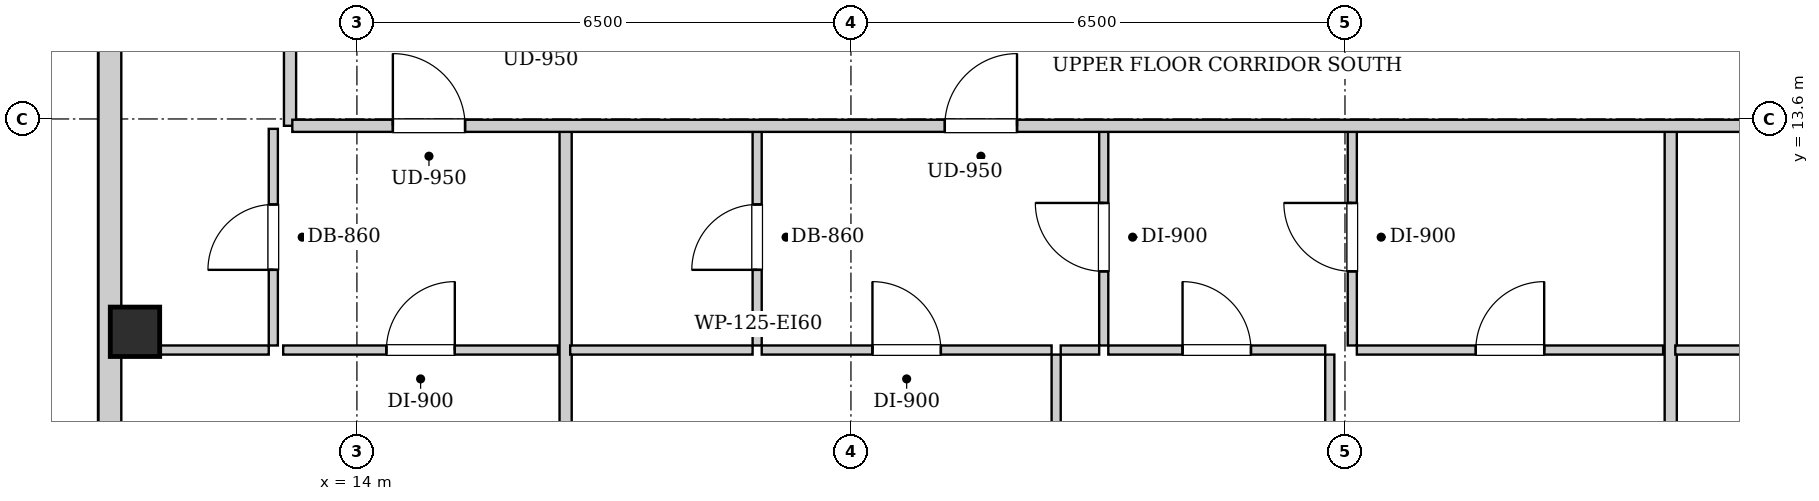
"""IFC4 building model, lengths in metres.
Left out: names, types, materials, properties, quantities, classifications, styles, units other than length and angle.
Written with IfcOpenShell. Run it as: python <this file> out.ifc"""

import sys

from ifc_helpers import new_model, si_unit, direction, frame, frame_2d, origin, origin_2d, place, context, subcontext, project, spatial, rectangle, extrude, element, fill, save


model = new_model("IFC4")
c1 = context("Model", 3, precision=1e-05, world=origin(), true_north=direction((0.0, 1.0)))
c2 = subcontext(c1, "Body", "Model", "MODEL_VIEW")
j1 = project(units=[si_unit("LENGTHUNIT", "METRE"), si_unit("PLANEANGLEUNIT", "RADIAN")], contexts=[c1])
p1 = place(None, origin())
s1 = spatial("IfcSite", under=j1, at=p1, CompositionType="ELEMENT")
p2 = place(p1, origin())
s2 = spatial("IfcBuilding", under=s1, at=p2, CompositionType="ELEMENT")
p3 = place(p2, frame((0.0, 0.0, 200.8)))
s3 = spatial("IfcBuildingStorey", under=s2, at=p3, CompositionType="ELEMENT", Elevation=200.8)
p4 = place(p3, frame((11.08, 10.8, 0.0), z_axis=(0.0, 0.0, 1.0), x_axis=(1.0, 0.0, 0.0)))
e1 = element("IfcColumn", 1, at=p4, inside=s3, PredefinedType="COLUMN", context=c2, shape_type="SweptSolid", body=[
    extrude(rectangle(XDim=0.65, YDim=0.65, at=origin_2d()), origin(), (0.0, 0.0, 1.0), 3.3),
])
p5 = place(p3, frame((10.75, 6.3, 0.0), z_axis=(0.0, 0.0, 1.0), x_axis=(0.0, 1.0, 0.0)))
e2 = element("IfcWall", 2, at=p5, inside=s3, PredefinedType="SOLIDWALL", context=c2, shape_type="SweptSolid", body=[
    extrude(rectangle(XDim=31.4, YDim=0.3, at=frame_2d((15.7, 0.0))), origin(), (0.0, 0.0, 1.0), 3.04),
])
p6 = place(p5, frame((1.504, 0.0, 0.55)))
e3 = element("IfcOpeningElement", 3, at=p6, cuts=e2, PredefinedType="OPENING", context=c2, shape_type="SweptSolid", body=[
    extrude(rectangle(XDim=1.35, YDim=1.2, at=frame_2d((0.675, 0.6))), frame((0.0, 0.16, 0.0), z_axis=(0.0, -1.0, 0.0), x_axis=(1.0, 0.0, 0.0)), (0.0, 0.0, 1.0), 0.32),
])
p7 = place(p5, frame((28.546, 0.0, 0.55)))
e4 = element("IfcOpeningElement", 4, at=p7, cuts=e2, PredefinedType="OPENING", context=c2, shape_type="SweptSolid", body=[
    extrude(rectangle(XDim=1.35, YDim=1.2, at=frame_2d((0.675, 0.6))), frame((0.0, 0.16, 0.0), z_axis=(0.0, -1.0, 0.0), x_axis=(1.0, 0.0, 0.0)), (0.0, 0.0, 1.0), 0.32),
])
p8 = place(p5, frame((11.85, 0.0, 0.55)))
e5 = element("IfcOpeningElement", 5, at=p8, cuts=e2, PredefinedType="OPENING", context=c2, shape_type="SweptSolid", body=[
    extrude(rectangle(XDim=1.35, YDim=1.2, at=frame_2d((0.675, 0.6))), frame((0.0, 0.16, 0.0), z_axis=(0.0, -1.0, 0.0), x_axis=(1.0, 0.0, 0.0)), (0.0, 0.0, 1.0), 0.32),
])
p9 = place(p5, frame((9.185, 0.0, 0.55)))
e6 = element("IfcOpeningElement", 6, at=p9, cuts=e2, PredefinedType="OPENING", context=c2, shape_type="SweptSolid", body=[
    extrude(rectangle(XDim=1.35, YDim=1.2, at=frame_2d((0.675, 0.6))), frame((0.0, 0.16, 0.0), z_axis=(0.0, -1.0, 0.0), x_axis=(1.0, 0.0, 0.0)), (0.0, 0.0, 1.0), 0.32),
])
p10 = place(p5, frame((19.006, 0.0, 0.55)))
e7 = element("IfcOpeningElement", 7, at=p10, cuts=e2, PredefinedType="OPENING", context=c2, shape_type="SweptSolid", body=[
    extrude(rectangle(XDim=1.35, YDim=1.2, at=frame_2d((0.675, 0.6))), frame((0.0, 0.16, 0.0), z_axis=(0.0, -1.0, 0.0), x_axis=(1.0, 0.0, 0.0)), (0.0, 0.0, 1.0), 0.32),
])
p11 = place(p5, frame((20.616, 0.0, 0.55)))
e8 = element("IfcOpeningElement", 8, at=p11, cuts=e2, PredefinedType="OPENING", context=c2, shape_type="SweptSolid", body=[
    extrude(rectangle(XDim=1.35, YDim=1.2, at=frame_2d((0.675, 0.6))), frame((0.0, 0.16, 0.0), z_axis=(0.0, -1.0, 0.0), x_axis=(1.0, 0.0, 0.0)), (0.0, 0.0, 1.0), 0.32),
])
p12 = place(p3, frame((13.12, 13.51, 0.0), z_axis=(0.0, 0.0, 1.0), x_axis=(0.0, 1.0, 0.0)))
e9 = element("IfcWall", 9, at=p12, inside=s3, PredefinedType="PARTITIONING", context=c2, shape_type="SweptSolid", body=[
    extrude(rectangle(XDim=1.58, YDim=0.16, at=frame_2d((0.79, 0.0))), origin(), (0.0, 0.0, 1.0), 3.04),
])
p13 = place(p3, frame((12.9, 10.62, 0.0), z_axis=(0.0, 0.0, 1.0), x_axis=(0.0, 1.0, 0.0)))
e10 = element("IfcWall", 10, at=p13, inside=s3, PredefinedType="PARTITIONING", context=c2, shape_type="SweptSolid", body=[
    extrude(rectangle(XDim=2.85, YDim=0.12, at=frame_2d((1.425, 0.0))), origin(), (0.0, 0.0, 1.0), 3.04),
])
p14 = place(p13, frame((0.995, 0.0, 0.0)))
e11 = element("IfcOpeningElement", 11, at=p14, cuts=e10, PredefinedType="OPENING", context=c2, shape_type="SweptSolid", body=[
    extrude(rectangle(XDim=0.86, YDim=2.05, at=frame_2d((0.43, 1.025))), frame((0.0, 0.07, 0.0), z_axis=(0.0, -1.0, 0.0), x_axis=(1.0, 0.0, 0.0)), (0.0, 0.0, 1.0), 0.14),
])
p15 = place(p3, frame((10.99, 10.56, 0.0), z_axis=(0.0, 0.0, 1.0), x_axis=(1.0, 0.0, 0.0)))
e12 = element("IfcWall", 12, at=p15, inside=s3, PredefinedType="PARTITIONING", context=c2, shape_type="SweptSolid", body=[
    extrude(rectangle(XDim=1.85, YDim=0.12, at=frame_2d((0.925, 0.0))), origin(), (0.0, 0.0, 1.0), 3.04),
])
p16 = place(p3, frame((13.03, 10.56, 0.0), z_axis=(0.0, 0.0, 1.0), x_axis=(1.0, 0.0, 0.0)))
e13 = element("IfcWall", 13, at=p16, inside=s3, PredefinedType="PARTITIONING", context=c2, shape_type="SweptSolid", body=[
    extrude(rectangle(XDim=3.616, YDim=0.12, at=frame_2d((1.808, 0.0))), origin(), (0.0, 0.0, 1.0), 3.04),
])
p17 = place(p16, frame((1.358, 0.0, 0.0)))
e14 = element("IfcOpeningElement", 14, at=p17, cuts=e13, PredefinedType="OPENING", context=c2, shape_type="SweptSolid", body=[
    extrude(rectangle(XDim=0.9, YDim=2.05, at=frame_2d((0.45, 1.025))), frame((0.0, 0.07, 0.0), z_axis=(0.0, -1.0, 0.0), x_axis=(1.0, 0.0, 0.0)), (0.0, 0.0, 1.0), 0.14),
])
p18 = place(p3, frame((16.746, 6.06, 0.0), z_axis=(0.0, 0.0, 1.0), x_axis=(0.0, 1.0, 0.0)))
e15 = element("IfcWall", 15, at=p18, inside=s3, PredefinedType="PARTITIONING", context=c2, shape_type="SweptSolid", body=[
    extrude(rectangle(XDim=7.41, YDim=0.16, at=frame_2d((3.705, 0.0))), origin(), (0.0, 0.0, 1.0), 3.04),
])
p19 = place(p3, frame((19.266, 10.62, 0.0), z_axis=(0.0, 0.0, 1.0), x_axis=(0.0, 1.0, 0.0)))
e16 = element("IfcWall", 16, at=p19, inside=s3, PredefinedType="PARTITIONING", context=c2, shape_type="SweptSolid", body=[
    extrude(rectangle(XDim=2.85, YDim=0.12, at=frame_2d((1.425, 0.0))), origin(), (0.0, 0.0, 1.0), 3.04),
])
p20 = place(p19, frame((0.995, 0.0, 0.0)))
e17 = element("IfcOpeningElement", 17, at=p20, cuts=e16, PredefinedType="OPENING", context=c2, shape_type="SweptSolid", body=[
    extrude(rectangle(XDim=0.86, YDim=2.05, at=frame_2d((0.43, 1.025))), frame((0.0, 0.07, 0.0), z_axis=(0.0, -1.0, 0.0), x_axis=(1.0, 0.0, 0.0)), (0.0, 0.0, 1.0), 0.14),
])
p21 = place(p3, frame((16.806, 10.56, 0.0), z_axis=(0.0, 0.0, 1.0), x_axis=(1.0, 0.0, 0.0)))
e18 = element("IfcWall", 18, at=p21, inside=s3, PredefinedType="PARTITIONING", context=c2, shape_type="SweptSolid", body=[
    extrude(rectangle(XDim=2.4, YDim=0.12, at=frame_2d((1.2, 0.0))), origin(), (0.0, 0.0, 1.0), 3.04),
])
p22 = place(p3, frame((23.826, 10.62, 0.0), z_axis=(0.0, 0.0, 1.0), x_axis=(0.0, 1.0, 0.0)))
e19 = element("IfcWall", 19, at=p22, inside=s3, PredefinedType="PARTITIONING", context=c2, shape_type="SweptSolid", body=[
    extrude(rectangle(XDim=2.85, YDim=0.12, at=frame_2d((1.425, 0.0))), origin(), (0.0, 0.0, 1.0), 3.04),
])
p23 = place(p22, frame((0.975, 0.0, 0.0)))
e20 = element("IfcOpeningElement", 20, at=p23, cuts=e19, PredefinedType="OPENING", context=c2, shape_type="SweptSolid", body=[
    extrude(rectangle(XDim=0.9, YDim=2.05, at=frame_2d((0.45, 1.025))), frame((0.0, 0.07, 0.0), z_axis=(0.0, -1.0, 0.0), x_axis=(1.0, 0.0, 0.0)), (0.0, 0.0, 1.0), 0.14),
])
p24 = place(p3, frame((19.326, 10.56, 0.0), z_axis=(0.0, 0.0, 1.0), x_axis=(1.0, 0.0, 0.0)))
e21 = element("IfcWall", 21, at=p24, inside=s3, PredefinedType="PARTITIONING", context=c2, shape_type="SweptSolid", body=[
    extrude(rectangle(XDim=3.814, YDim=0.12, at=frame_2d((1.907, 0.0))), origin(), (0.0, 0.0, 1.0), 3.04),
])
p25 = place(p24, frame((1.457, 0.0, 0.0)))
e22 = element("IfcOpeningElement", 22, at=p25, cuts=e21, PredefinedType="OPENING", context=c2, shape_type="SweptSolid", body=[
    extrude(rectangle(XDim=0.9, YDim=2.05, at=frame_2d((0.45, 1.025))), frame((0.0, 0.07, 0.0), z_axis=(0.0, -1.0, 0.0), x_axis=(1.0, 0.0, 0.0)), (0.0, 0.0, 1.0), 0.14),
])
p26 = place(p3, frame((23.26, 10.56, 0.0), z_axis=(0.0, 0.0, 1.0), x_axis=(1.0, 0.0, 0.0)))
e23 = element("IfcWall", 23, at=p26, inside=s3, PredefinedType="PARTITIONING", context=c2, shape_type="SweptSolid", body=[
    extrude(rectangle(XDim=0.506, YDim=0.12, at=frame_2d((0.253, 0.0))), origin(), (0.0, 0.0, 1.0), 3.04),
])
p27 = place(p3, frame((27.096, 10.62, 0.0), z_axis=(0.0, 0.0, 1.0), x_axis=(0.0, 1.0, 0.0)))
e24 = element("IfcWall", 24, at=p27, inside=s3, PredefinedType="PARTITIONING", context=c2, shape_type="SweptSolid", body=[
    extrude(rectangle(XDim=2.85, YDim=0.12, at=frame_2d((1.425, 0.0))), origin(), (0.0, 0.0, 1.0), 3.04),
])
p28 = place(p27, frame((0.975, 0.0, 0.0)))
e25 = element("IfcOpeningElement", 25, at=p28, cuts=e24, PredefinedType="OPENING", context=c2, shape_type="SweptSolid", body=[
    extrude(rectangle(XDim=0.9, YDim=2.05, at=frame_2d((0.45, 1.025))), frame((0.0, 0.07, 0.0), z_axis=(0.0, -1.0, 0.0), x_axis=(1.0, 0.0, 0.0)), (0.0, 0.0, 1.0), 0.14),
])
p29 = place(p3, frame((23.886, 10.56, 0.0), z_axis=(0.0, 0.0, 1.0), x_axis=(1.0, 0.0, 0.0)))
e26 = element("IfcWall", 26, at=p29, inside=s3, PredefinedType="PARTITIONING", context=c2, shape_type="SweptSolid", body=[
    extrude(rectangle(XDim=2.854, YDim=0.12, at=frame_2d((1.427, 0.0))), origin(), (0.0, 0.0, 1.0), 3.04),
])
p30 = place(p29, frame((0.977, 0.0, 0.0)))
e27 = element("IfcOpeningElement", 27, at=p30, cuts=e26, PredefinedType="OPENING", context=c2, shape_type="SweptSolid", body=[
    extrude(rectangle(XDim=0.9, YDim=2.05, at=frame_2d((0.45, 1.025))), frame((0.0, 0.07, 0.0), z_axis=(0.0, -1.0, 0.0), x_axis=(1.0, 0.0, 0.0)), (0.0, 0.0, 1.0), 0.14),
])
p31 = place(p3, frame((27.156, 10.56, 0.0), z_axis=(0.0, 0.0, 1.0), x_axis=(1.0, 0.0, 0.0)))
e28 = element("IfcWall", 28, at=p31, inside=s3, PredefinedType="PARTITIONING", context=c2, shape_type="SweptSolid", body=[
    extrude(rectangle(XDim=4.03, YDim=0.12, at=frame_2d((2.015, 0.0))), origin(), (0.0, 0.0, 1.0), 3.04),
])
p32 = place(p31, frame((1.565, 0.0, 0.0)))
e29 = element("IfcOpeningElement", 29, at=p32, cuts=e28, PredefinedType="OPENING", context=c2, shape_type="SweptSolid", body=[
    extrude(rectangle(XDim=0.9, YDim=2.05, at=frame_2d((0.45, 1.025))), frame((0.0, 0.07, 0.0), z_axis=(0.0, -1.0, 0.0), x_axis=(1.0, 0.0, 0.0)), (0.0, 0.0, 1.0), 0.14),
])
p33 = place(p3, frame((23.2, 4.08, 0.0), z_axis=(0.0, 0.0, 1.0), x_axis=(0.0, 1.0, 0.0)))
e30 = element("IfcWall", 30, at=p33, inside=s3, PredefinedType="PARTITIONING", context=c2, shape_type="SweptSolid", body=[
    extrude(rectangle(XDim=6.42, YDim=0.12, at=frame_2d((3.21, 0.0))), origin(), (0.0, 0.0, 1.0), 3.04),
])
p34 = place(p33, frame((2.745, 0.0, 0.0)))
e31 = element("IfcOpeningElement", 31, at=p34, cuts=e30, PredefinedType="OPENING", context=c2, shape_type="SweptSolid", body=[
    extrude(rectangle(XDim=0.9, YDim=2.05, at=frame_2d((0.45, 1.025))), frame((0.0, 0.07, 0.0), z_axis=(0.0, -1.0, 0.0), x_axis=(1.0, 0.0, 0.0)), (0.0, 0.0, 1.0), 0.14),
])
p35 = place(p3, frame((26.8, 4.08, 0.0), z_axis=(0.0, 0.0, 1.0), x_axis=(0.0, 1.0, 0.0)))
e32 = element("IfcWall", 32, at=p35, inside=s3, PredefinedType="PARTITIONING", context=c2, shape_type="SweptSolid", body=[
    extrude(rectangle(XDim=6.42, YDim=0.12, at=frame_2d((3.21, 0.0))), origin(), (0.0, 0.0, 1.0), 3.04),
])
p36 = place(p35, frame((2.745, 0.0, 0.0)))
e33 = element("IfcOpeningElement", 33, at=p36, cuts=e32, PredefinedType="OPENING", context=c2, shape_type="SweptSolid", body=[
    extrude(rectangle(XDim=0.9, YDim=2.05, at=frame_2d((0.45, 1.025))), frame((0.0, 0.07, 0.0), z_axis=(0.0, -1.0, 0.0), x_axis=(1.0, 0.0, 0.0)), (0.0, 0.0, 1.0), 0.14),
])
p37 = place(p3, frame((31.286, 4.08, 0.0), z_axis=(0.0, 0.0, 1.0), x_axis=(0.0, 1.0, 0.0)))
e34 = element("IfcWall", 34, at=p37, inside=s3, PredefinedType="PARTITIONING", context=c2, shape_type="SweptSolid", body=[
    extrude(rectangle(XDim=9.39, YDim=0.16, at=frame_2d((4.695, 0.0))), origin(), (0.0, 0.0, 1.0), 3.04),
])
p38 = place(p3, frame((31.346, 10.56, 0.0), z_axis=(0.0, 0.0, 1.0), x_axis=(1.0, 0.0, 0.0)))
e35 = element("IfcWall", 35, at=p38, inside=s3, PredefinedType="PARTITIONING", context=c2, shape_type="SweptSolid", body=[
    extrude(rectangle(XDim=1.912, YDim=0.12, at=frame_2d((0.956, 0.0))), origin(), (0.0, 0.0, 1.0), 3.04),
])
p39 = place(p3, frame((13.15, 13.51, 0.0), z_axis=(0.0, 0.0, 1.0), x_axis=(1.0, 0.0, 0.0)))
e36 = element("IfcWall", 36, at=p39, inside=s3, PredefinedType="PARTITIONING", context=c2, shape_type="SweptSolid", body=[
    extrude(rectangle(XDim=24.6, YDim=0.16, at=frame_2d((12.3, 0.0))), origin(), (0.0, 0.0, 1.0), 3.04),
])
p40 = place(p39, frame((1.323, 0.0, 0.0)))
e37 = element("IfcOpeningElement", 37, at=p40, cuts=e36, PredefinedType="OPENING", context=c2, shape_type="SweptSolid", body=[
    extrude(rectangle(XDim=0.95, YDim=2.1, at=frame_2d((0.475, 1.05))), frame((0.0, 0.09, 0.0), z_axis=(0.0, -1.0, 0.0), x_axis=(1.0, 0.0, 0.0)), (0.0, 0.0, 1.0), 0.18),
])
p41 = place(p39, frame((8.585, 0.0, 0.0)))
e38 = element("IfcOpeningElement", 38, at=p41, cuts=e36, PredefinedType="OPENING", context=c2, shape_type="SweptSolid", body=[
    extrude(rectangle(XDim=0.95, YDim=2.1, at=frame_2d((0.475, 1.05))), frame((0.0, 0.09, 0.0), z_axis=(0.0, -1.0, 0.0), x_axis=(1.0, 0.0, 0.0)), (0.0, 0.0, 1.0), 0.18),
])
p42 = place(p39, frame((21.889, 0.0, 0.0)))
e39 = element("IfcOpeningElement", 39, at=p42, cuts=e36, PredefinedType="OPENING", context=c2, shape_type="SweptSolid", body=[
    extrude(rectangle(XDim=0.95, YDim=2.1, at=frame_2d((0.475, 1.05))), frame((0.0, 0.09, 0.0), z_axis=(0.0, -1.0, 0.0), x_axis=(1.0, 0.0, 0.0)), (0.0, 0.0, 1.0), 0.18),
])
p43 = place(p14, origin())
e40 = element("IfcDoor", 40, at=p43, inside=s3, OperationType="SINGLE_SWING_LEFT", PredefinedType="DOOR", context=c2, shape_type="SweptSolid", body=[
    extrude(rectangle(XDim=0.86, YDim=2.05, at=frame_2d((0.43, 1.025))), frame((0.0, 0.025, 0.0), z_axis=(0.0, -1.0, 0.0), x_axis=(1.0, 0.0, 0.0)), (0.0, 0.0, 1.0), 0.05),
])
fill(e11, e40)
p44 = place(p17, origin())
e41 = element("IfcDoor", 41, at=p44, inside=s3, OperationType="SINGLE_SWING_RIGHT", PredefinedType="DOOR", context=c2, shape_type="SweptSolid", body=[
    extrude(rectangle(XDim=0.9, YDim=2.05, at=frame_2d((0.45, 1.025))), frame((0.0, 0.025, 0.0), z_axis=(0.0, -1.0, 0.0), x_axis=(1.0, 0.0, 0.0)), (0.0, 0.0, 1.0), 0.05),
])
fill(e14, e41)
p45 = place(p20, origin())
e42 = element("IfcDoor", 42, at=p45, inside=s3, OperationType="SINGLE_SWING_LEFT", PredefinedType="DOOR", context=c2, shape_type="SweptSolid", body=[
    extrude(rectangle(XDim=0.86, YDim=2.05, at=frame_2d((0.43, 1.025))), frame((0.0, 0.025, 0.0), z_axis=(0.0, -1.0, 0.0), x_axis=(1.0, 0.0, 0.0)), (0.0, 0.0, 1.0), 0.05),
])
fill(e17, e42)
p46 = place(p23, origin())
e43 = element("IfcDoor", 43, at=p46, inside=s3, OperationType="SINGLE_SWING_RIGHT", PredefinedType="DOOR", context=c2, shape_type="SweptSolid", body=[
    extrude(rectangle(XDim=0.9, YDim=2.05, at=frame_2d((0.45, 1.025))), frame((0.0, 0.025, 0.0), z_axis=(0.0, -1.0, 0.0), x_axis=(1.0, 0.0, 0.0)), (0.0, 0.0, 1.0), 0.05),
])
fill(e20, e43)
p47 = place(p25, origin())
e44 = element("IfcDoor", 44, at=p47, inside=s3, OperationType="SINGLE_SWING_LEFT", PredefinedType="DOOR", context=c2, shape_type="SweptSolid", body=[
    extrude(rectangle(XDim=0.9, YDim=2.05, at=frame_2d((0.45, 1.025))), frame((0.0, 0.025, 0.0), z_axis=(0.0, -1.0, 0.0), x_axis=(1.0, 0.0, 0.0)), (0.0, 0.0, 1.0), 0.05),
])
fill(e22, e44)
p48 = place(p28, origin())
e45 = element("IfcDoor", 45, at=p48, inside=s3, OperationType="SINGLE_SWING_RIGHT", PredefinedType="DOOR", context=c2, shape_type="SweptSolid", body=[
    extrude(rectangle(XDim=0.9, YDim=2.05, at=frame_2d((0.45, 1.025))), frame((0.0, 0.025, 0.0), z_axis=(0.0, -1.0, 0.0), x_axis=(1.0, 0.0, 0.0)), (0.0, 0.0, 1.0), 0.05),
])
fill(e25, e45)
p49 = place(p30, origin())
e46 = element("IfcDoor", 46, at=p49, inside=s3, OperationType="SINGLE_SWING_LEFT", PredefinedType="DOOR", context=c2, shape_type="SweptSolid", body=[
    extrude(rectangle(XDim=0.9, YDim=2.05, at=frame_2d((0.45, 1.025))), frame((0.0, 0.025, 0.0), z_axis=(0.0, -1.0, 0.0), x_axis=(1.0, 0.0, 0.0)), (0.0, 0.0, 1.0), 0.05),
])
fill(e27, e46)
p50 = place(p32, origin())
e47 = element("IfcDoor", 47, at=p50, inside=s3, OperationType="SINGLE_SWING_RIGHT", PredefinedType="DOOR", context=c2, shape_type="SweptSolid", body=[
    extrude(rectangle(XDim=0.9, YDim=2.05, at=frame_2d((0.45, 1.025))), frame((0.0, 0.025, 0.0), z_axis=(0.0, -1.0, 0.0), x_axis=(1.0, 0.0, 0.0)), (0.0, 0.0, 1.0), 0.05),
])
fill(e29, e47)
p51 = place(p40, origin())
e48 = element("IfcDoor", 48, at=p51, inside=s3, OperationType="SINGLE_SWING_LEFT", PredefinedType="DOOR", context=c2, shape_type="SweptSolid", body=[
    extrude(rectangle(XDim=0.95, YDim=2.1, at=frame_2d((0.475, 1.05))), frame((0.0, 0.025, 0.0), z_axis=(0.0, -1.0, 0.0), x_axis=(1.0, 0.0, 0.0)), (0.0, 0.0, 1.0), 0.05),
])
fill(e37, e48)
p52 = place(p41, origin())
e49 = element("IfcDoor", 49, at=p52, inside=s3, OperationType="SINGLE_SWING_RIGHT", PredefinedType="DOOR", context=c2, shape_type="SweptSolid", body=[
    extrude(rectangle(XDim=0.95, YDim=2.1, at=frame_2d((0.475, 1.05))), frame((0.0, 0.025, 0.0), z_axis=(0.0, -1.0, 0.0), x_axis=(1.0, 0.0, 0.0)), (0.0, 0.0, 1.0), 0.05),
])
fill(e38, e49)
save(model, sys.argv[1])
